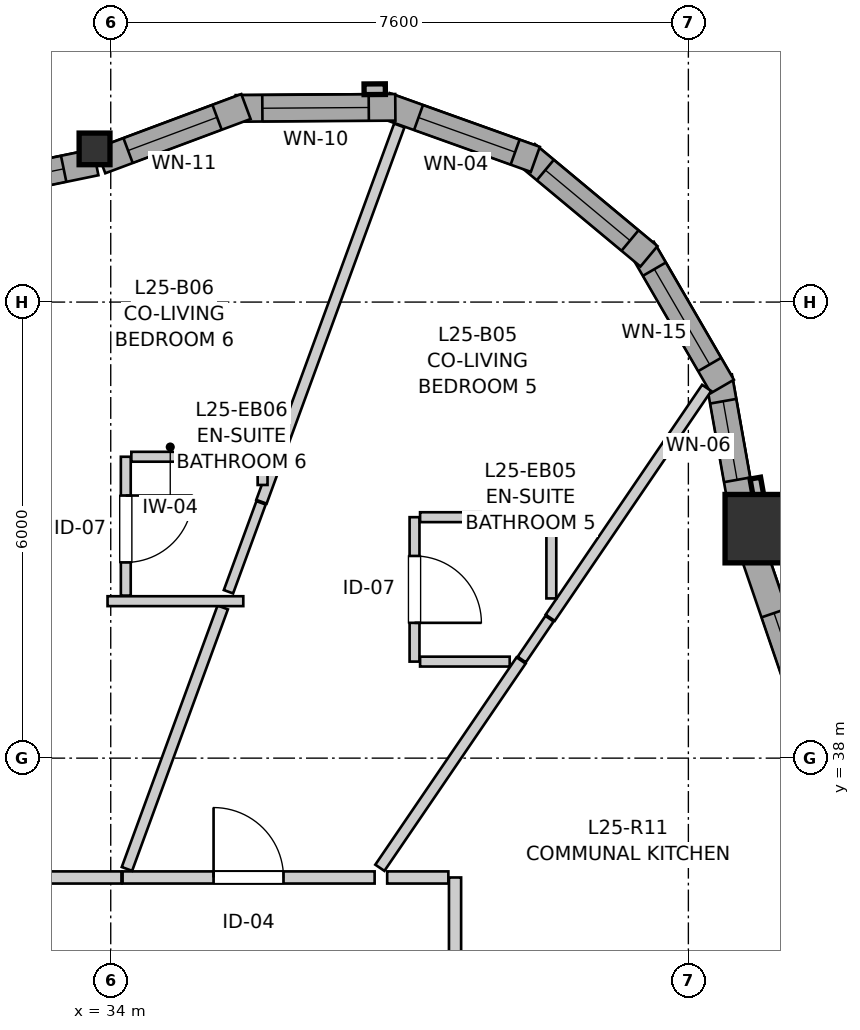
"""IFC4 building model, lengths in metres.
Left out: names, types, materials, properties, quantities, classifications, styles, units other than length and angle.
Written with IfcOpenShell. Run it as: python <this file> out.ifc"""

import sys

from ifc_helpers import new_model, si_unit, direction, frame, frame_2d, origin, origin_2d, place, context, subcontext, project, spatial, rectangle, i_section, extrude, source, transform, mapped, element, fill, save


model = new_model("IFC4")
c1 = context("Model", 3, precision=1e-05, world=origin(), true_north=direction((0.0, 1.0)))
c2 = subcontext(c1, "Body", "Model", "MODEL_VIEW")
j1 = project(units=[si_unit("LENGTHUNIT", "METRE"), si_unit("PLANEANGLEUNIT", "RADIAN")], contexts=[c1])
p1 = place(None, origin())
s1 = spatial("IfcSite", under=j1, at=p1, CompositionType="ELEMENT")
p2 = place(p1, origin())
s2 = spatial("IfcBuilding", under=s1, at=p2, CompositionType="ELEMENT")
p3 = place(p2, frame((0.0, 0.0, 86.4)))
s3 = spatial("IfcBuildingStorey", under=s2, at=p3, CompositionType="ELEMENT", Elevation=86.4)
m1 = source(origin(), c2, "Body", "SweptSolid", [
    extrude(rectangle(XDim=0.9, YDim=0.9, at=origin_2d()), origin(), (0.0, 0.0, 1.0), 2.95),
])
p4 = place(p3, frame((42.532, 41.019, 0.0), z_axis=(0.0, 0.0, 1.0), x_axis=(1.0, 0.0, 0.0)))
e1 = element("IfcColumn", 1, at=p4, inside=s3, PredefinedType="COLUMN", context=c2, shape_type="MappedRepresentation", body=[
    mapped(m1, transform((0.0, 0.0, 0.0), x_axis=(1.0, 0.0, 0.0), y_axis=(0.0, 1.0, 0.0), z_axis=(0.0, 0.0, 1.0), scale=1.0)),
])
m2 = source(origin(), c2, "Body", "SweptSolid", [
    extrude(i_section(OverallWidth=0.406, OverallDepth=0.416, WebThickness=0.027, FlangeThickness=0.044, FilletRadius=0.015, at=origin_2d()), origin(), (0.0, 0.0, 1.0), 2.95),
])
p5 = place(p3, frame((33.787, 46.015, 0.0), z_axis=(0.0, 0.0, 1.0), x_axis=(1.0, 0.0, 0.0)))
e2 = element("IfcColumn", 2, at=p5, inside=s3, PredefinedType="PILASTER", context=c2, shape_type="MappedRepresentation", body=[
    mapped(m2, transform((0.0, 0.0, 0.0), x_axis=(1.0, 0.0, 0.0), y_axis=(0.0, 1.0, 0.0), z_axis=(0.0, 0.0, 1.0), scale=1.0)),
])
p6 = place(p3, frame((43.406, 37.923, 0.0), z_axis=(0.0, 0.0, 1.0), x_axis=(-0.323597196737, 0.946194934601, 0.0)))
e3 = element("IfcWall", 3, at=p6, inside=s3, PredefinedType="SOLIDWALL", context=c2, shape_type="SweptSolid", body=[
    extrude(rectangle(XDim=2.988, YDim=0.35, at=frame_2d((1.494, 0.0))), origin(), (0.0, 0.0, 1.0), 2.48),
])
p7 = place(p6, frame((0.899, 0.0, 0.82)))
e4 = element("IfcOpeningElement", 4, at=p7, cuts=e3, PredefinedType="OPENING", context=c2, shape_type="SweptSolid", body=[
    extrude(rectangle(XDim=1.2, YDim=1.45, at=frame_2d((0.6, 0.725))), frame((0.0, 0.185, 0.0), z_axis=(0.0, -1.0, 0.0), x_axis=(1.0, 0.0, 0.0)), (0.0, 0.0, 1.0), 0.37),
])
p8 = place(p3, frame((42.321, 41.21, 0.0), z_axis=(0.0, 0.0, 1.0), x_axis=(-0.174331490339, 0.984687022092, 0.0)))
e5 = element("IfcWall", 5, at=p8, inside=s3, PredefinedType="SOLIDWALL", context=c2, shape_type="SweptSolid", body=[
    extrude(rectangle(XDim=1.836, YDim=0.35, at=frame_2d((0.918, 0.0))), origin(), (0.0, 0.0, 1.0), 2.48),
])
p9 = place(p8, frame((0.458, 0.0, 0.82)))
e6 = element("IfcOpeningElement", 6, at=p9, cuts=e5, PredefinedType="OPENING", context=c2, shape_type="SweptSolid", body=[
    extrude(rectangle(XDim=1.05, YDim=1.45, at=frame_2d((0.525, 0.725))), frame((0.0, 0.185, 0.0), z_axis=(0.0, -1.0, 0.0), x_axis=(1.0, 0.0, 0.0)), (0.0, 0.0, 1.0), 0.37),
])
p10 = place(p3, frame((42.047, 42.89, 0.0), z_axis=(0.0, 0.0, 1.0), x_axis=(-0.501902596059, 0.864924149315, 0.0)))
e7 = element("IfcWall", 7, at=p10, inside=s3, PredefinedType="SOLIDWALL", context=c2, shape_type="SweptSolid", body=[
    extrude(rectangle(XDim=2.099, YDim=0.35, at=frame_2d((1.049, 0.0))), origin(), (0.0, 0.0, 1.0), 2.48),
])
p11 = place(p10, frame((0.333, 0.0, 0.82)))
e8 = element("IfcOpeningElement", 8, at=p11, cuts=e7, PredefinedType="OPENING", context=c2, shape_type="SweptSolid", body=[
    extrude(rectangle(XDim=1.45, YDim=1.25, at=frame_2d((0.725, 0.625))), frame((0.0, 0.185, 0.0), z_axis=(0.0, -1.0, 0.0), x_axis=(1.0, 0.0, 0.0)), (0.0, 0.0, 1.0), 0.37),
])
p12 = place(p3, frame((41.082, 44.602, 0.0), z_axis=(0.0, 0.0, 1.0), x_axis=(-0.768497696041, 0.639852554249, 0.0)))
e9 = element("IfcWall", 9, at=p12, inside=s3, PredefinedType="SOLIDWALL", context=c2, shape_type="SweptSolid", body=[
    extrude(rectangle(XDim=2.099, YDim=0.35, at=frame_2d((1.049, 0.0))), origin(), (0.0, 0.0, 1.0), 2.48),
])
p13 = place(p12, frame((0.324, 0.0, 0.82)))
e10 = element("IfcOpeningElement", 10, at=p13, cuts=e9, PredefinedType="OPENING", context=c2, shape_type="SweptSolid", body=[
    extrude(rectangle(XDim=1.45, YDim=1.25, at=frame_2d((0.725, 0.625))), frame((0.0, 0.185, 0.0), z_axis=(0.0, -1.0, 0.0), x_axis=(1.0, 0.0, 0.0)), (0.0, 0.0, 1.0), 0.37),
])
p14 = place(p3, frame((39.586, 45.877, 0.0), z_axis=(0.0, 0.0, 1.0), x_axis=(-0.941473186867, 0.33708787936, 0.0)))
e11 = element("IfcWall", 11, at=p14, inside=s3, PredefinedType="SOLIDWALL", context=c2, shape_type="SweptSolid", body=[
    extrude(rectangle(XDim=2.099, YDim=0.35, at=frame_2d((1.049, 0.0))), origin(), (0.0, 0.0, 1.0), 2.48),
])
p15 = place(p14, frame((0.283, 0.0, 0.82)))
e12 = element("IfcOpeningElement", 12, at=p15, cuts=e11, PredefinedType="OPENING", context=c2, shape_type="SweptSolid", body=[
    extrude(rectangle(XDim=1.35, YDim=1.45, at=frame_2d((0.675, 0.725))), frame((0.0, 0.185, 0.0), z_axis=(0.0, -1.0, 0.0), x_axis=(1.0, 0.0, 0.0)), (0.0, 0.0, 1.0), 0.37),
])
p16 = place(p3, frame((37.744, 46.562, 0.0), z_axis=(0.0, 0.0, 1.0), x_axis=(-0.999976451414, -0.006862697526, 0.0)))
e13 = element("IfcWall", 13, at=p16, inside=s3, PredefinedType="SOLIDWALL", context=c2, shape_type="SweptSolid", body=[
    extrude(rectangle(XDim=2.099, YDim=0.35, at=frame_2d((1.049, 0.0))), origin(), (0.0, 0.0, 1.0), 2.48),
])
p17 = place(p16, frame((0.35, 0.0, 0.82)))
e14 = element("IfcOpeningElement", 14, at=p17, cuts=e13, PredefinedType="OPENING", context=c2, shape_type="SweptSolid", body=[
    extrude(rectangle(XDim=1.4, YDim=1.35, at=frame_2d((0.7, 0.675))), frame((0.0, 0.185, 0.0), z_axis=(0.0, -1.0, 0.0), x_axis=(1.0, 0.0, 0.0)), (0.0, 0.0, 1.0), 0.37),
])
p18 = place(p3, frame((35.779, 46.573, 0.0), z_axis=(0.0, 0.0, 1.0), x_axis=(-0.9368002254, -0.349864741994, 0.0)))
e15 = element("IfcWall", 15, at=p18, inside=s3, PredefinedType="SOLIDWALL", context=c2, shape_type="SweptSolid", body=[
    extrude(rectangle(XDim=2.041, YDim=0.35, at=frame_2d((1.021, 0.0))), origin(), (0.0, 0.0, 1.0), 2.48),
])
p19 = place(p18, frame((0.406, 0.0, 0.82)))
e16 = element("IfcOpeningElement", 16, at=p19, cuts=e15, PredefinedType="OPENING", context=c2, shape_type="SweptSolid", body=[
    extrude(rectangle(XDim=1.25, YDim=1.35, at=frame_2d((0.625, 0.675))), frame((0.0, 0.185, 0.0), z_axis=(0.0, -1.0, 0.0), x_axis=(1.0, 0.0, 0.0)), (0.0, 0.0, 1.0), 0.37),
])
p20 = place(p3, frame((33.803, 45.84, 0.0), z_axis=(0.0, 0.0, 1.0), x_axis=(-0.97943222174, -0.201773444777, 0.0)))
e17 = element("IfcWall", 17, at=p20, inside=s3, PredefinedType="SOLIDWALL", context=c2, shape_type="SweptSolid", body=[
    extrude(rectangle(XDim=3.144, YDim=0.35, at=frame_2d((1.572, 0.0))), origin(), (0.0, 0.0, 1.0), 2.48),
])
p21 = place(p20, frame((0.431, 0.0, 0.82)))
e18 = element("IfcOpeningElement", 18, at=p21, cuts=e17, PredefinedType="OPENING", context=c2, shape_type="SweptSolid", body=[
    extrude(rectangle(XDim=0.95, YDim=1.35, at=frame_2d((0.475, 0.675))), frame((0.0, 0.185, 0.0), z_axis=(0.0, -1.0, 0.0), x_axis=(1.0, 0.0, 0.0)), (0.0, 0.0, 1.0), 0.37),
])
p22 = place(p20, frame((1.933, 0.0, 0.82)))
e19 = element("IfcOpeningElement", 19, at=p22, cuts=e17, PredefinedType="OPENING", context=c2, shape_type="SweptSolid", body=[
    extrude(rectangle(XDim=0.95, YDim=1.35, at=frame_2d((0.475, 0.675))), frame((0.0, 0.185, 0.0), z_axis=(0.0, -1.0, 0.0), x_axis=(1.0, 0.0, 0.0)), (0.0, 0.0, 1.0), 0.37),
])
p23 = place(p3, frame((38.53, 36.43, 0.0), z_axis=(0.0, 0.0, 1.0), x_axis=(0.0, -1.0, 0.0)))
e20 = element("IfcWall", 20, at=p23, inside=s3, PredefinedType="PARTITIONING", context=c2, shape_type="SweptSolid", body=[
    extrude(rectangle(XDim=4.559, YDim=0.16, at=frame_2d((2.279, 0.0))), origin(), (0.0, 0.0, 1.0), 2.588),
])
p24 = place(p23, frame((1.646, 0.0, 0.0)))
e21 = element("IfcOpeningElement", 21, at=p24, cuts=e20, PredefinedType="OPENING", context=c2, shape_type="SweptSolid", body=[
    extrude(rectangle(XDim=1.3, YDim=2.1, at=frame_2d((0.65, 1.05))), frame((0.0, 0.09, 0.0), z_axis=(0.0, -1.0, 0.0), x_axis=(1.0, 0.0, 0.0)), (0.0, 0.0, 1.0), 0.18),
])
p25 = place(p3, frame((34.156, 36.43, 0.0), z_axis=(0.0, 0.0, 1.0), x_axis=(1.0, 0.0, 0.0)))
e22 = element("IfcWall", 22, at=p25, inside=s3, PredefinedType="PARTITIONING", context=c2, shape_type="SweptSolid", body=[
    extrude(rectangle(XDim=3.316, YDim=0.16, at=frame_2d((1.658, 0.0))), origin(), (0.0, 0.0, 1.0), 2.95),
])
p26 = place(p25, frame((1.197, 0.0, 0.0)))
e23 = element("IfcOpeningElement", 23, at=p26, cuts=e22, PredefinedType="OPENING", context=c2, shape_type="SweptSolid", body=[
    extrude(rectangle(XDim=0.92, YDim=2.1, at=frame_2d((0.46, 1.05))), frame((0.0, 0.09, 0.0), z_axis=(0.0, -1.0, 0.0), x_axis=(1.0, 0.0, 0.0)), (0.0, 0.0, 1.0), 0.18),
])
p27 = place(p3, frame((31.335, 36.43, 0.0), z_axis=(0.0, 0.0, 1.0), x_axis=(1.0, 0.0, 0.0)))
e24 = element("IfcWall", 24, at=p27, inside=s3, PredefinedType="PARTITIONING", context=c2, shape_type="SweptSolid", body=[
    extrude(rectangle(XDim=2.806, YDim=0.16, at=frame_2d((1.403, 0.0))), origin(), (0.0, 0.0, 1.0), 2.95),
])
p28 = place(p27, frame((0.944, 0.0, 0.0)))
e25 = element("IfcOpeningElement", 25, at=p28, cuts=e24, PredefinedType="OPENING", context=c2, shape_type="SweptSolid", body=[
    extrude(rectangle(XDim=0.92, YDim=2.1, at=frame_2d((0.46, 1.05))), frame((0.0, 0.09, 0.0), z_axis=(0.0, -1.0, 0.0), x_axis=(1.0, 0.0, 0.0)), (0.0, 0.0, 1.0), 0.18),
])
p29 = place(p3, frame((34.198, 41.965, 0.0), z_axis=(0.0, 0.0, 1.0), x_axis=(0.0, -1.0, 0.0)))
e26 = element("IfcWall", 26, at=p29, inside=s3, PredefinedType="PARTITIONING", context=c2, shape_type="SweptSolid", body=[
    extrude(rectangle(XDim=1.827, YDim=0.13, at=frame_2d((0.914, 0.0))), origin(), (0.0, 0.0, 1.0), 2.95),
])
p30 = place(p29, frame((0.51, 0.0, 0.0)))
e27 = element("IfcOpeningElement", 27, at=p30, cuts=e26, PredefinedType="OPENING", context=c2, shape_type="SweptSolid", body=[
    extrude(rectangle(XDim=0.88, YDim=2.05, at=frame_2d((0.44, 1.025))), frame((0.0, 0.075, 0.0), z_axis=(0.0, -1.0, 0.0), x_axis=(1.0, 0.0, 0.0)), (0.0, 0.0, 1.0), 0.15),
])
p31 = place(p3, frame((37.997, 41.17, 0.0), z_axis=(0.0, 0.0, 1.0), x_axis=(0.0, -1.0, 0.0)))
e28 = element("IfcWall", 28, at=p31, inside=s3, PredefinedType="PARTITIONING", context=c2, shape_type="SweptSolid", body=[
    extrude(rectangle(XDim=1.9, YDim=0.13, at=frame_2d((0.95, 0.0))), origin(), (0.0, 0.0, 1.0), 2.95),
])
p32 = place(p31, frame((0.51, 0.0, 0.0)))
e29 = element("IfcOpeningElement", 29, at=p32, cuts=e28, PredefinedType="OPENING", context=c2, shape_type="SweptSolid", body=[
    extrude(rectangle(XDim=0.88, YDim=2.05, at=frame_2d((0.44, 1.025))), frame((0.0, 0.075, 0.0), z_axis=(0.0, -1.0, 0.0), x_axis=(1.0, 0.0, 0.0)), (0.0, 0.0, 1.0), 0.15),
])
p33 = place(p3, frame((38.659, 31.93, 0.0), z_axis=(0.0, 0.0, 1.0), x_axis=(0.813936175568, 0.580954302938, 0.0)))
e30 = element("IfcWall", 30, at=p33, inside=s3, PredefinedType="PARTITIONING", context=c2, shape_type="SweptSolid", body=[
    extrude(rectangle(XDim=6.346, YDim=0.145, at=frame_2d((3.173, 0.0))), origin(), (0.0, 0.0, 1.0), 2.95),
])
p34 = place(p3, frame((35.983, 41.373, 0.0), z_axis=(0.0, 0.0, 1.0), x_axis=(0.343972978133, 0.938979547335, 0.0)))
e31 = element("IfcWall", 31, at=p34, inside=s3, PredefinedType="PARTITIONING", context=c2, shape_type="SweptSolid", body=[
    extrude(rectangle(XDim=5.272, YDim=0.145, at=frame_2d((2.636, 0.0))), origin(), (0.0, 0.0, 1.0), 2.95),
])
p35 = place(p3, frame((34.213, 36.542, 0.0), z_axis=(0.0, 0.0, 1.0), x_axis=(0.343978558693, 0.93897750301, 0.0)))
e32 = element("IfcWall", 32, at=p35, inside=s3, PredefinedType="PARTITIONING", context=c2, shape_type="SweptSolid", body=[
    extrude(rectangle(XDim=3.664, YDim=0.145, at=frame_2d((1.832, 0.0))), origin(), (0.0, 0.0, 1.0), 2.95),
])
p36 = place(p3, frame((39.782, 39.847, 0.0), z_axis=(0.0, 0.0, 1.0), x_axis=(0.562744405359, 0.826630954077, 0.0)))
e33 = element("IfcWall", 33, at=p36, inside=s3, PredefinedType="PARTITIONING", context=c2, shape_type="SweptSolid", body=[
    extrude(rectangle(XDim=3.658, YDim=0.145, at=frame_2d((1.829, 0.0))), origin(), (0.0, 0.0, 1.0), 2.95),
])
p37 = place(p3, frame((37.541, 36.557, 0.0), z_axis=(0.0, 0.0, 1.0), x_axis=(0.563020017907, 0.826443258449, 0.0)))
e34 = element("IfcWall", 34, at=p37, inside=s3, PredefinedType="PARTITIONING", context=c2, shape_type="SweptSolid", body=[
    extrude(rectangle(XDim=3.3, YDim=0.145, at=frame_2d((1.65, 0.0))), origin(), (0.0, 0.0, 1.0), 2.95),
])
p38 = place(p3, frame((38.07, 41.17, 0.0), z_axis=(0.0, 0.0, 1.0), x_axis=(1.0, 0.0, 0.0)))
e35 = element("IfcWall", 35, at=p38, inside=s3, PredefinedType="PARTITIONING", context=c2, shape_type="SweptSolid", body=[
    extrude(rectangle(XDim=1.727, YDim=0.13, at=frame_2d((0.864, 0.0))), origin(), (0.0, 0.0, 1.0), 2.95),
])
p39 = place(p3, frame((34.271, 41.965, 0.0), z_axis=(0.0, 0.0, 1.0), x_axis=(1.0, 0.0, 0.0)))
e36 = element("IfcWall", 36, at=p39, inside=s3, PredefinedType="PARTITIONING", context=c2, shape_type="SweptSolid", body=[
    extrude(rectangle(XDim=1.727, YDim=0.13, at=frame_2d((0.864, 0.0))), origin(), (0.0, 0.0, 1.0), 2.118),
])
p40 = place(p3, frame((38.07, 39.27, 0.0), z_axis=(0.0, 0.0, 1.0), x_axis=(1.0, 0.0, 0.0)))
e37 = element("IfcWall", 37, at=p40, inside=s3, PredefinedType="PARTITIONING", context=c2, shape_type="SweptSolid", body=[
    extrude(rectangle(XDim=1.179, YDim=0.13, at=frame_2d((0.589, 0.0))), origin(), (0.0, 0.0, 1.0), 2.95),
])
p41 = place(p3, frame((35.549, 40.189, 0.0), z_axis=(0.0, 0.0, 1.0), x_axis=(0.344070409158, 0.938943850048, 0.0)))
e38 = element("IfcWall", 38, at=p41, inside=s3, PredefinedType="PARTITIONING", context=c2, shape_type="SweptSolid", body=[
    extrude(rectangle(XDim=1.246, YDim=0.13, at=frame_2d((0.623, 0.0))), origin(), (0.0, 0.0, 1.0), 2.95),
])
p42 = place(p3, frame((33.958, 40.065, 0.0), z_axis=(0.0, 0.0, 1.0), x_axis=(1.0, 0.0, 0.0)))
e39 = element("IfcWall", 39, at=p42, inside=s3, PredefinedType="PARTITIONING", context=c2, shape_type="SweptSolid", body=[
    extrude(rectangle(XDim=1.786, YDim=0.13, at=frame_2d((0.893, 0.0))), origin(), (0.0, 0.0, 1.0), 2.95),
])
p43 = place(p3, frame((39.797, 40.101, 0.0), z_axis=(0.0, 0.0, 1.0), x_axis=(0.0, 1.0, 0.0)))
e40 = element("IfcWall", 40, at=p43, inside=s3, PredefinedType="PARTITIONING", context=c2, shape_type="SweptSolid", body=[
    extrude(rectangle(XDim=0.996, YDim=0.13, at=frame_2d((0.498, 0.0))), origin(), (0.0, 0.0, 1.0), 2.95),
])
p44 = place(p3, frame((37.637, 36.43, 0.0), z_axis=(0.0, 0.0, 1.0), x_axis=(1.0, 0.0, 0.0)))
e41 = element("IfcWall", 41, at=p44, inside=s3, PredefinedType="PARTITIONING", context=c2, shape_type="SweptSolid", body=[
    extrude(rectangle(XDim=0.805, YDim=0.16, at=frame_2d((0.402, 0.0))), origin(), (0.0, 0.0, 1.0), 2.95),
])
p45 = place(p3, frame((39.408, 39.297, 0.0), z_axis=(0.0, 0.0, 1.0), x_axis=(0.562042989861, 0.827108020483, 0.0)))
e42 = element("IfcWall", 42, at=p45, inside=s3, PredefinedType="PARTITIONING", context=c2, shape_type="SweptSolid", body=[
    extrude(rectangle(XDim=0.65, YDim=0.13, at=frame_2d((0.325, 0.0))), origin(), (0.0, 0.0, 1.0), 2.95),
])
p46 = place(p3, frame((35.998, 41.594, 0.0), z_axis=(0.0, 0.0, 1.0), x_axis=(0.0, 1.0, 0.0)))
e43 = element("IfcWall", 43, at=p46, inside=s3, PredefinedType="PARTITIONING", context=c2, shape_type="SweptSolid", body=[
    extrude(rectangle(XDim=0.371, YDim=0.13, at=frame_2d((0.186, 0.0))), origin(), (0.0, 0.0, 1.0), 2.95),
])
m3 = source(origin(), c2, "Body", "SweptSolid", [
    extrude(rectangle(XDim=1.2, YDim=1.45, at=frame_2d((0.6, 0.725))), frame((0.0, 0.03, 0.0), z_axis=(0.0, -1.0, 0.0), x_axis=(1.0, 0.0, 0.0)), (0.0, 0.0, 1.0), 0.06),
])
p47 = place(p7, origin())
e44 = element("IfcWindow", 44, at=p47, inside=s3, PartitioningType="SINGLE_PANEL", PredefinedType="WINDOW", context=c2, shape_type="MappedRepresentation", body=[
    mapped(m3, transform((0.0, 0.0, 0.0), x_axis=(1.0, 0.0, 0.0), y_axis=(0.0, 1.0, 0.0), z_axis=(0.0, 0.0, 1.0), scale=1.0)),
])
fill(e4, e44)
m4 = source(origin(), c2, "Body", "SweptSolid", [
    extrude(rectangle(XDim=1.05, YDim=1.45, at=frame_2d((0.525, 0.725))), frame((0.0, 0.03, 0.0), z_axis=(0.0, -1.0, 0.0), x_axis=(1.0, 0.0, 0.0)), (0.0, 0.0, 1.0), 0.06),
])
p48 = place(p9, origin())
e45 = element("IfcWindow", 45, at=p48, inside=s3, PartitioningType="SINGLE_PANEL", PredefinedType="WINDOW", context=c2, shape_type="MappedRepresentation", body=[
    mapped(m4, transform((0.0, 0.0, 0.0), x_axis=(1.0, 0.0, 0.0), y_axis=(0.0, 1.0, 0.0), z_axis=(0.0, 0.0, 1.0), scale=1.0)),
])
fill(e6, e45)
m5 = source(origin(), c2, "Body", "SweptSolid", [
    extrude(rectangle(XDim=1.45, YDim=1.25, at=frame_2d((0.725, 0.625))), frame((0.0, 0.03, 0.0), z_axis=(0.0, -1.0, 0.0), x_axis=(1.0, 0.0, 0.0)), (0.0, 0.0, 1.0), 0.06),
])
p49 = place(p11, origin())
e46 = element("IfcWindow", 46, at=p49, inside=s3, PartitioningType="SINGLE_PANEL", PredefinedType="WINDOW", context=c2, shape_type="MappedRepresentation", body=[
    mapped(m5, transform((0.0, 0.0, 0.0), x_axis=(1.0, 0.0, 0.0), y_axis=(0.0, 1.0, 0.0), z_axis=(0.0, 0.0, 1.0), scale=1.0)),
])
fill(e8, e46)
p50 = place(p13, origin())
e47 = element("IfcWindow", 47, at=p50, inside=s3, PartitioningType="SINGLE_PANEL", PredefinedType="WINDOW", context=c2, shape_type="MappedRepresentation", body=[
    mapped(m5, transform((0.0, 0.0, 0.0), x_axis=(1.0, 0.0, 0.0), y_axis=(0.0, 1.0, 0.0), z_axis=(0.0, 0.0, 1.0), scale=1.0)),
])
fill(e10, e47)
m6 = source(origin(), c2, "Body", "SweptSolid", [
    extrude(rectangle(XDim=1.35, YDim=1.45, at=frame_2d((0.675, 0.725))), frame((0.0, 0.03, 0.0), z_axis=(0.0, -1.0, 0.0), x_axis=(1.0, 0.0, 0.0)), (0.0, 0.0, 1.0), 0.06),
])
p51 = place(p15, origin())
e48 = element("IfcWindow", 48, at=p51, inside=s3, PartitioningType="SINGLE_PANEL", PredefinedType="WINDOW", context=c2, shape_type="MappedRepresentation", body=[
    mapped(m6, transform((0.0, 0.0, 0.0), x_axis=(1.0, 0.0, 0.0), y_axis=(0.0, 1.0, 0.0), z_axis=(0.0, 0.0, 1.0), scale=1.0)),
])
fill(e12, e48)
m7 = source(origin(), c2, "Body", "SweptSolid", [
    extrude(rectangle(XDim=1.4, YDim=1.35, at=frame_2d((0.7, 0.675))), frame((0.0, 0.03, 0.0), z_axis=(0.0, -1.0, 0.0), x_axis=(1.0, 0.0, 0.0)), (0.0, 0.0, 1.0), 0.06),
])
p52 = place(p17, origin())
e49 = element("IfcWindow", 49, at=p52, inside=s3, PartitioningType="SINGLE_PANEL", PredefinedType="WINDOW", context=c2, shape_type="MappedRepresentation", body=[
    mapped(m7, transform((0.0, 0.0, 0.0), x_axis=(1.0, 0.0, 0.0), y_axis=(0.0, 1.0, 0.0), z_axis=(0.0, 0.0, 1.0), scale=1.0)),
])
fill(e14, e49)
m8 = source(origin(), c2, "Body", "SweptSolid", [
    extrude(rectangle(XDim=1.25, YDim=1.35, at=frame_2d((0.625, 0.675))), frame((0.0, 0.03, 0.0), z_axis=(0.0, -1.0, 0.0), x_axis=(1.0, 0.0, 0.0)), (0.0, 0.0, 1.0), 0.06),
])
p53 = place(p19, origin())
e50 = element("IfcWindow", 50, at=p53, inside=s3, PartitioningType="SINGLE_PANEL", PredefinedType="WINDOW", context=c2, shape_type="MappedRepresentation", body=[
    mapped(m8, transform((0.0, 0.0, 0.0), x_axis=(1.0, 0.0, 0.0), y_axis=(0.0, 1.0, 0.0), z_axis=(0.0, 0.0, 1.0), scale=1.0)),
])
fill(e16, e50)
m9 = source(origin(), c2, "Body", "SweptSolid", [
    extrude(rectangle(XDim=0.95, YDim=1.35, at=frame_2d((0.475, 0.675))), frame((0.0, 0.03, 0.0), z_axis=(0.0, -1.0, 0.0), x_axis=(1.0, 0.0, 0.0)), (0.0, 0.0, 1.0), 0.06),
])
p54 = place(p21, origin())
e51 = element("IfcWindow", 51, at=p54, inside=s3, PartitioningType="SINGLE_PANEL", PredefinedType="WINDOW", context=c2, shape_type="MappedRepresentation", body=[
    mapped(m9, transform((0.0, 0.0, 0.0), x_axis=(1.0, 0.0, 0.0), y_axis=(0.0, 1.0, 0.0), z_axis=(0.0, 0.0, 1.0), scale=1.0)),
])
fill(e18, e51)
m10 = source(origin(), c2, "Body", "SweptSolid", [
    extrude(rectangle(XDim=0.92, YDim=2.1, at=frame_2d((0.46, 1.05))), frame((0.0, 0.025, 0.0), z_axis=(0.0, -1.0, 0.0), x_axis=(1.0, 0.0, 0.0)), (0.0, 0.0, 1.0), 0.05),
])
p55 = place(p26, origin())
e52 = element("IfcDoor", 52, at=p55, inside=s3, OperationType="SINGLE_SWING_LEFT", PredefinedType="DOOR", context=c2, shape_type="MappedRepresentation", body=[
    mapped(m10, transform((0.0, 0.0, 0.0), x_axis=(1.0, 0.0, 0.0), y_axis=(0.0, 1.0, 0.0), z_axis=(0.0, 0.0, 1.0), scale=1.0)),
])
fill(e23, e52)
m11 = source(origin(), c2, "Body", "SweptSolid", [
    extrude(rectangle(XDim=0.88, YDim=2.05, at=frame_2d((0.44, 1.025))), frame((0.0, 0.025, 0.0), z_axis=(0.0, -1.0, 0.0), x_axis=(1.0, 0.0, 0.0)), (0.0, 0.0, 1.0), 0.05),
])
p56 = place(p30, origin())
e53 = element("IfcDoor", 53, at=p56, inside=s3, OperationType="SINGLE_SWING_LEFT", PredefinedType="DOOR", context=c2, shape_type="MappedRepresentation", body=[
    mapped(m11, transform((0.0, 0.0, 0.0), x_axis=(1.0, 0.0, 0.0), y_axis=(0.0, 1.0, 0.0), z_axis=(0.0, 0.0, 1.0), scale=1.0)),
])
fill(e27, e53)
p57 = place(p32, origin())
e54 = element("IfcDoor", 54, at=p57, inside=s3, OperationType="SINGLE_SWING_RIGHT", PredefinedType="DOOR", context=c2, shape_type="MappedRepresentation", body=[
    mapped(m11, transform((0.0, 0.0, 0.0), x_axis=(1.0, 0.0, 0.0), y_axis=(0.0, 1.0, 0.0), z_axis=(0.0, 0.0, 1.0), scale=1.0)),
])
fill(e29, e54)
save(model, sys.argv[1])
